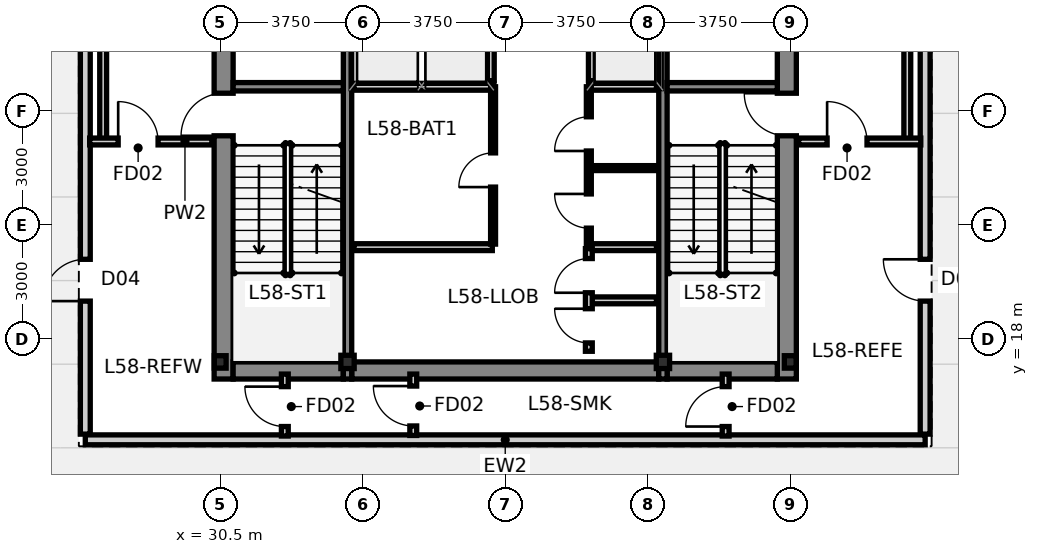
"""IFC4 building model, lengths in metres.
Left out: names, types, materials, properties, quantities, classifications, styles, units other than length and angle.
Written with IfcOpenShell. Run it as: python <this file> out.ifc"""

import sys

from ifc_helpers import new_model, si_unit, direction, frame, frame_2d, origin, origin_2d, place, context, subcontext, project, spatial, rectangle, hollow_rectangle, i_section, extrude, source, transform, mapped, element, fill, save


model = new_model("IFC4")
c1 = context("Model", 3, precision=1e-05, world=origin(), true_north=direction((0.0, 1.0)))
c2 = subcontext(c1, "Body", "Model", "MODEL_VIEW")
j1 = project(units=[si_unit("LENGTHUNIT", "METRE"), si_unit("PLANEANGLEUNIT", "RADIAN")], contexts=[c1])
p1 = place(None, origin())
s1 = spatial("IfcSite", under=j1, at=p1, CompositionType="ELEMENT")
p2 = place(p1, origin())
s2 = spatial("IfcBuilding", under=s1, at=p2, CompositionType="ELEMENT")
p3 = place(p2, frame((0.0, 0.0, 220.55)))
s3 = spatial("IfcBuildingStorey", under=s2, at=p3, CompositionType="ELEMENT", Elevation=220.55)
m1 = source(origin(), c2, "Body", "SweptSolid", [
    extrude(i_section(OverallWidth=0.311, OverallDepth=0.327, WebThickness=0.016, FlangeThickness=0.025, at=origin_2d()), origin(), (0.0, 0.0, 1.0), 4.8),
])
for number, where, z_axis, x_axis in (
    (1, (30.5, 17.4, 0.0), (0.0, 0.0, 1.0), (1.0, 0.0, 0.0)),
    (2, (45.5, 17.4, 0.0), (0.0, 0.0, 1.0), (1.0, 0.0, 0.0)),
):
    element("IfcColumn", number, at=place(p3, frame(where, z_axis=z_axis, x_axis=x_axis)), inside=s3, PredefinedType="COLUMN", context=c2, shape_type="MappedRepresentation", body=[
        mapped(m1, transform((0.0, 0.0, 0.0), scale=1.0)),
    ])
m2 = source(origin(), c2, "Body", "SweptSolid", [
    extrude(hollow_rectangle(XDim=0.35, YDim=0.35, WallThickness=0.016, at=origin_2d()), origin(), (0.0, 0.0, 1.0), 4.8),
])
for number, where, z_axis, x_axis in (
    (3, (33.85, 17.4, 0.0), (0.0, 0.0, 1.0), (1.0, 0.0, 0.0)),
    (4, (42.15, 17.4, 0.0), (0.0, 0.0, 1.0), (1.0, 0.0, 0.0)),
):
    element("IfcColumn", number, at=place(p3, frame(where, z_axis=z_axis, x_axis=x_axis)), inside=s3, PredefinedType="COLUMN", context=c2, shape_type="MappedRepresentation", body=[
        mapped(m2, transform((0.0, 0.0, 0.0), scale=1.0)),
    ])
p4 = place(p3, frame((30.59, 16.95, 0.0), z_axis=(0.0, 0.0, 1.0), x_axis=(0.0, 1.0, 0.0)))
e5 = element("IfcWall", 5, at=p4, inside=s3, PredefinedType="SHEAR", context=c2, shape_type="SweptSolid", body=[
    extrude(rectangle(XDim=13.275, YDim=0.5, at=frame_2d((6.638, 0.0))), origin(), (0.0, 0.0, 1.0), 4.8),
])
p5 = place(p4, frame((6.4, 0.0, 0.0)))
e6 = element("IfcOpeningElement", 6, at=p5, cuts=e5, PredefinedType="OPENING", context=c2, shape_type="SweptSolid", body=[
    extrude(rectangle(XDim=1.12, YDim=2.15, at=frame_2d((0.56, 1.075))), frame((0.0, 0.262, 0.0), z_axis=(0.0, -1.0, 0.0), x_axis=(1.0, 0.0, 0.0)), (0.0, 0.0, 1.0), 0.524),
])
p6 = place(p4, frame((10.85, 0.0, 0.0)))
e7 = element("IfcOpeningElement", 7, at=p6, cuts=e5, PredefinedType="OPENING", context=c2, shape_type="SweptSolid", body=[
    extrude(rectangle(XDim=1.2, YDim=2.2, at=frame_2d((0.6, 1.1))), frame((0.0, 0.262, 0.0), z_axis=(0.0, -1.0, 0.0), x_axis=(1.0, 0.0, 0.0)), (0.0, 0.0, 1.0), 0.524),
])
p7 = place(p3, frame((45.41, 16.95, 0.0), z_axis=(0.0, 0.0, 1.0), x_axis=(0.0, 1.0, 0.0)))
e8 = element("IfcWall", 8, at=p7, inside=s3, PredefinedType="SHEAR", context=c2, shape_type="SweptSolid", body=[
    extrude(rectangle(XDim=13.275, YDim=0.5, at=frame_2d((6.638, 0.0))), origin(), (0.0, 0.0, 1.0), 4.8),
])
p8 = place(p7, frame((6.4, 0.0, 0.0)))
e9 = element("IfcOpeningElement", 9, at=p8, cuts=e8, PredefinedType="OPENING", context=c2, shape_type="SweptSolid", body=[
    extrude(rectangle(XDim=1.12, YDim=2.15, at=frame_2d((0.56, 1.075))), frame((0.0, 0.262, 0.0), z_axis=(0.0, -1.0, 0.0), x_axis=(1.0, 0.0, 0.0)), (0.0, 0.0, 1.0), 0.524),
])
p9 = place(p7, frame((10.85, 0.0, 0.0)))
e10 = element("IfcOpeningElement", 10, at=p9, cuts=e8, PredefinedType="OPENING", context=c2, shape_type="SweptSolid", body=[
    extrude(rectangle(XDim=1.2, YDim=2.2, at=frame_2d((0.6, 1.1))), frame((0.0, 0.262, 0.0), z_axis=(0.0, -1.0, 0.0), x_axis=(1.0, 0.0, 0.0)), (0.0, 0.0, 1.0), 0.524),
])
p10 = place(p3, frame((30.84, 17.175, 0.0), z_axis=(0.0, 0.0, 1.0), x_axis=(1.0, 0.0, 0.0)))
e11 = element("IfcWall", 11, at=p10, inside=s3, PredefinedType="SHEAR", context=c2, shape_type="SweptSolid", body=[
    extrude(rectangle(XDim=2.9, YDim=0.45, at=frame_2d((1.45, 0.0))), origin(), (0.0, 0.0, 1.0), 4.8),
])
p11 = place(p3, frame((33.96, 17.175, 0.0), z_axis=(0.0, 0.0, 1.0), x_axis=(1.0, 0.0, 0.0)))
e12 = element("IfcWall", 12, at=p11, inside=s3, PredefinedType="SHEAR", context=c2, shape_type="SweptSolid", body=[
    extrude(rectangle(XDim=8.08, YDim=0.45, at=frame_2d((4.04, 0.0))), origin(), (0.0, 0.0, 1.0), 4.8),
])
p12 = place(p3, frame((42.26, 17.175, 0.0), z_axis=(0.0, 0.0, 1.0), x_axis=(1.0, 0.0, 0.0)))
e13 = element("IfcWall", 13, at=p12, inside=s3, PredefinedType="SHEAR", context=c2, shape_type="SweptSolid", body=[
    extrude(rectangle(XDim=2.9, YDim=0.45, at=frame_2d((1.45, 0.0))), origin(), (0.0, 0.0, 1.0), 4.8),
])
for number, where, z_axis, x_axis in (
    (14, (33.85, 16.95, 0.0), (0.0, 0.0, 1.0), (0.0, 1.0, 0.0)),
    (15, (42.15, 16.95, 0.0), (0.0, 0.0, 1.0), (0.0, 1.0, 0.0)),
):
    element("IfcWall", number, at=place(p3, frame(where, z_axis=z_axis, x_axis=x_axis)), inside=s3, PredefinedType="SHEAR", context=c2, shape_type="SweptSolid", body=[
        extrude(rectangle(XDim=13.275, YDim=0.22, at=frame_2d((6.638, 0.0))), origin(), (0.0, 0.0, 1.0), 4.8),
    ])
for number, where, z_axis, x_axis in (
    (16, (30.84, 24.64, 0.0), (0.0, 0.0, 1.0), (1.0, 0.0, 0.0)),
    (17, (42.26, 24.64, 0.0), (0.0, 0.0, 1.0), (1.0, 0.0, 0.0)),
):
    element("IfcWall", number, at=place(p3, frame(where, z_axis=z_axis, x_axis=x_axis)), inside=s3, PredefinedType="SHEAR", context=c2, shape_type="SweptSolid", body=[
        extrude(rectangle(XDim=2.9, YDim=0.22, at=frame_2d((1.45, 0.0))), origin(), (0.0, 0.0, 1.0), 4.8),
    ])
p13 = place(p3, frame((26.95, 15.35, 0.0), z_axis=(0.0, 0.0, 1.0), x_axis=(1.0, 0.0, 0.0)))
e18 = element("IfcWall", 18, at=p13, inside=s3, PredefinedType="STANDARD", context=c2, shape_type="SweptSolid", body=[
    extrude(rectangle(XDim=22.1, YDim=0.26, at=frame_2d((11.05, 0.0))), origin(), (0.0, 0.0, 1.0), 4.55),
])
p14 = place(p3, frame((26.95, 15.5, 0.0), z_axis=(0.0, 0.0, 1.0), x_axis=(0.0, 1.0, 0.0)))
e19 = element("IfcWall", 19, at=p14, inside=s3, PredefinedType="STANDARD", context=c2, shape_type="SweptSolid", body=[
    extrude(rectangle(XDim=17.0, YDim=0.26, at=frame_2d((8.5, 0.0))), origin(), (0.0, 0.0, 1.0), 4.228),
])
p15 = place(p14, frame((3.5, 0.0, 0.0)))
e20 = element("IfcOpeningElement", 20, at=p15, cuts=e19, PredefinedType="OPENING", context=c2, shape_type="SweptSolid", body=[
    extrude(rectangle(XDim=1.1, YDim=2.2, at=frame_2d((0.55, 1.1))), frame((0.0, 0.142, 0.0), z_axis=(0.0, -1.0, 0.0), x_axis=(1.0, 0.0, 0.0)), (0.0, 0.0, 1.0), 0.284),
])
p16 = place(p3, frame((49.05, 15.5, 0.0), z_axis=(0.0, 0.0, 1.0), x_axis=(0.0, 1.0, 0.0)))
e21 = element("IfcWall", 21, at=p16, inside=s3, PredefinedType="STANDARD", context=c2, shape_type="SweptSolid", body=[
    extrude(rectangle(XDim=17.0, YDim=0.26, at=frame_2d((8.5, 0.0))), origin(), (0.0, 0.0, 1.0), 4.228),
])
p17 = place(p16, frame((3.5, 0.0, 0.0)))
e22 = element("IfcOpeningElement", 22, at=p17, cuts=e21, PredefinedType="OPENING", context=c2, shape_type="SweptSolid", body=[
    extrude(rectangle(XDim=1.1, YDim=2.2, at=frame_2d((0.55, 1.1))), frame((0.0, 0.142, 0.0), z_axis=(0.0, -1.0, 0.0), x_axis=(1.0, 0.0, 0.0)), (0.0, 0.0, 1.0), 0.284),
])
for number, where, z_axis, x_axis in (
    (23, (37.62, 24.8, 0.0), (0.0, 0.0, 1.0), (0.0, 1.0, 0.0)),
    (24, (40.28, 24.8, 0.0), (0.0, 0.0, 1.0), (0.0, 1.0, 0.0)),
):
    element("IfcWall", number, at=place(p3, frame(where, z_axis=z_axis, x_axis=x_axis)), inside=s3, PredefinedType="PARTITIONING", context=c2, shape_type="SweptSolid", body=[
        extrude(rectangle(XDim=2.0, YDim=0.18, at=frame_2d((1.0, 0.0))), origin(), (0.0, 0.0, 1.0), 4.55),
    ])
p18 = place(p3, frame((34.02, 24.64, 0.0), z_axis=(0.0, 0.0, 1.0), x_axis=(1.0, 0.0, 0.0)))
e25 = element("IfcWall", 25, at=p18, inside=s3, PredefinedType="PARTITIONING", context=c2, shape_type="SweptSolid", body=[
    extrude(rectangle(XDim=3.68, YDim=0.18, at=frame_2d((1.84, 0.0))), origin(), (0.0, 0.0, 1.0), 4.55),
])
p19 = place(p3, frame((40.2, 24.64, 0.0), z_axis=(0.0, 0.0, 1.0), x_axis=(1.0, 0.0, 0.0)))
e26 = element("IfcWall", 26, at=p19, inside=s3, PredefinedType="PARTITIONING", context=c2, shape_type="SweptSolid", body=[
    extrude(rectangle(XDim=1.78, YDim=0.18, at=frame_2d((0.89, 0.0))), origin(), (0.0, 0.0, 1.0), 4.55),
])
p20 = place(p3, frame((27.42, 23.2, 0.0), z_axis=(0.0, 0.0, 1.0), x_axis=(0.0, 1.0, 0.0)))
e27 = element("IfcWall", 27, at=p20, inside=s3, PredefinedType="PARTITIONING", context=c2, shape_type="SweptSolid", body=[
    extrude(rectangle(XDim=6.4, YDim=0.18, at=frame_2d((3.2, 0.0))), origin(), (0.0, 0.0, 1.0), 4.228),
])
p21 = place(p3, frame((27.065, 23.2, 0.0), z_axis=(0.0, 0.0, 1.0), x_axis=(1.0, 0.0, 0.0)))
e28 = element("IfcWall", 28, at=p21, inside=s3, PredefinedType="PARTITIONING", context=c2, shape_type="SweptSolid", body=[
    extrude(rectangle(XDim=3.215, YDim=0.18, at=frame_2d((1.607, 0.0))), origin(), (0.0, 0.0, 1.0), 4.55),
])
p22 = place(p21, frame((0.75, 0.0, 0.0)))
e29 = element("IfcOpeningElement", 29, at=p22, cuts=e28, PredefinedType="OPENING", context=c2, shape_type="SweptSolid", body=[
    extrude(rectangle(XDim=1.05, YDim=2.15, at=frame_2d((0.525, 1.075))), frame((0.0, 0.102, 0.0), z_axis=(0.0, -1.0, 0.0), x_axis=(1.0, 0.0, 0.0)), (0.0, 0.0, 1.0), 0.204),
])
p23 = place(p3, frame((48.58, 23.2, 0.0), z_axis=(0.0, 0.0, 1.0), x_axis=(0.0, 1.0, 0.0)))
e30 = element("IfcWall", 30, at=p23, inside=s3, PredefinedType="PARTITIONING", context=c2, shape_type="SweptSolid", body=[
    extrude(rectangle(XDim=6.4, YDim=0.18, at=frame_2d((3.2, 0.0))), origin(), (0.0, 0.0, 1.0), 4.228),
])
p24 = place(p3, frame((45.72, 23.2, 0.0), z_axis=(0.0, 0.0, 1.0), x_axis=(1.0, 0.0, 0.0)))
e31 = element("IfcWall", 31, at=p24, inside=s3, PredefinedType="PARTITIONING", context=c2, shape_type="SweptSolid", body=[
    extrude(rectangle(XDim=3.215, YDim=0.18, at=frame_2d((1.607, 0.0))), origin(), (0.0, 0.0, 1.0), 4.55),
])
p25 = place(p24, frame((0.75, 0.0, 0.0)))
e32 = element("IfcOpeningElement", 32, at=p25, cuts=e31, PredefinedType="OPENING", context=c2, shape_type="SweptSolid", body=[
    extrude(rectangle(XDim=1.05, YDim=2.15, at=frame_2d((0.525, 1.075))), frame((0.0, 0.102, 0.0), z_axis=(0.0, -1.0, 0.0), x_axis=(1.0, 0.0, 0.0)), (0.0, 0.0, 1.0), 0.204),
])
p26 = place(p3, frame((34.02, 20.42, 0.0), z_axis=(0.0, 0.0, 1.0), x_axis=(1.0, 0.0, 0.0)))
e33 = element("IfcWall", 33, at=p26, inside=s3, PredefinedType="PARTITIONING", context=c2, shape_type="SweptSolid", body=[
    extrude(rectangle(XDim=3.64, YDim=0.18, at=frame_2d((1.82, 0.0))), origin(), (0.0, 0.0, 1.0), 4.55),
])
p27 = place(p3, frame((40.22, 20.42, 0.0), z_axis=(0.0, 0.0, 1.0), x_axis=(1.0, 0.0, 0.0)))
e34 = element("IfcWall", 34, at=p27, inside=s3, PredefinedType="PARTITIONING", context=c2, shape_type="SweptSolid", body=[
    extrude(rectangle(XDim=1.76, YDim=0.18, at=frame_2d((0.88, 0.0))), origin(), (0.0, 0.0, 1.0), 4.55),
])
p28 = place(p3, frame((40.28, 22.5, 0.0), z_axis=(0.0, 0.0, 1.0), x_axis=(1.0, 0.0, 0.0)))
e35 = element("IfcWall", 35, at=p28, inside=s3, PredefinedType="PARTITIONING", context=c2, shape_type="SweptSolid", body=[
    extrude(rectangle(XDim=1.7, YDim=0.13, at=frame_2d((0.85, 0.0))), origin(), (0.0, 0.0, 1.0), 4.55),
])
p29 = place(p3, frame((37.68, 20.5, 0.0), z_axis=(0.0, 0.0, 1.0), x_axis=(0.0, 1.0, 0.0)))
e36 = element("IfcWall", 36, at=p29, inside=s3, PredefinedType="PARTITIONING", context=c2, shape_type="SweptSolid", body=[
    extrude(rectangle(XDim=4.14, YDim=0.13, at=frame_2d((2.07, 0.0))), origin(), (0.0, 0.0, 1.0), 4.55),
])
p30 = place(p29, frame((1.5, 0.0, 0.0)))
e37 = element("IfcOpeningElement", 37, at=p30, cuts=e36, PredefinedType="OPENING", context=c2, shape_type="SweptSolid", body=[
    extrude(rectangle(XDim=0.9, YDim=2.1, at=frame_2d((0.45, 1.05))), frame((0.0, 0.077, 0.0), z_axis=(0.0, -1.0, 0.0), x_axis=(1.0, 0.0, 0.0)), (0.0, 0.0, 1.0), 0.154),
])
p31 = place(p3, frame((40.2, 20.5, 0.0), z_axis=(0.0, 0.0, 1.0), x_axis=(0.0, 1.0, 0.0)))
e38 = element("IfcWall", 38, at=p31, inside=s3, PredefinedType="PARTITIONING", context=c2, shape_type="SweptSolid", body=[
    extrude(rectangle(XDim=4.14, YDim=0.13, at=frame_2d((2.07, 0.0))), origin(), (0.0, 0.0, 1.0), 4.55),
])
p32 = place(p31, frame((0.42, 0.0, 0.0)))
e39 = element("IfcOpeningElement", 39, at=p32, cuts=e38, PredefinedType="OPENING", context=c2, shape_type="SweptSolid", body=[
    extrude(rectangle(XDim=0.9, YDim=2.1, at=frame_2d((0.45, 1.05))), frame((0.0, 0.077, 0.0), z_axis=(0.0, -1.0, 0.0), x_axis=(1.0, 0.0, 0.0)), (0.0, 0.0, 1.0), 0.154),
])
p33 = place(p31, frame((2.45, 0.0, 0.0)))
e40 = element("IfcOpeningElement", 40, at=p33, cuts=e38, PredefinedType="OPENING", context=c2, shape_type="SweptSolid", body=[
    extrude(rectangle(XDim=0.9, YDim=2.1, at=frame_2d((0.45, 1.05))), frame((0.0, 0.077, 0.0), z_axis=(0.0, -1.0, 0.0), x_axis=(1.0, 0.0, 0.0)), (0.0, 0.0, 1.0), 0.154),
])
p34 = place(p3, frame((40.28, 19.02, 0.0), z_axis=(0.0, 0.0, 1.0), x_axis=(1.0, 0.0, 0.0)))
e41 = element("IfcWall", 41, at=p34, inside=s3, PredefinedType="PARTITIONING", context=c2, shape_type="SweptSolid", body=[
    extrude(rectangle(XDim=1.7, YDim=0.18, at=frame_2d((0.85, 0.0))), origin(), (0.0, 0.0, 1.0), 4.55),
])
p35 = place(p3, frame((40.2, 17.68, 0.0), z_axis=(0.0, 0.0, 1.0), x_axis=(0.0, 1.0, 0.0)))
e42 = element("IfcWall", 42, at=p35, inside=s3, PredefinedType="PARTITIONING", context=c2, shape_type="SweptSolid", body=[
    extrude(rectangle(XDim=2.7, YDim=0.18, at=frame_2d((1.35, 0.0))), origin(), (0.0, 0.0, 1.0), 4.55),
])
p36 = place(p35, frame((0.22, 0.0, 0.0)))
e43 = element("IfcOpeningElement", 43, at=p36, cuts=e42, PredefinedType="OPENING", context=c2, shape_type="SweptSolid", body=[
    extrude(rectangle(XDim=0.9, YDim=2.1, at=frame_2d((0.45, 1.05))), frame((0.0, 0.102, 0.0), z_axis=(0.0, -1.0, 0.0), x_axis=(1.0, 0.0, 0.0)), (0.0, 0.0, 1.0), 0.204),
])
p37 = place(p35, frame((1.54, 0.0, 0.0)))
e44 = element("IfcOpeningElement", 44, at=p37, cuts=e42, PredefinedType="OPENING", context=c2, shape_type="SweptSolid", body=[
    extrude(rectangle(XDim=0.9, YDim=2.1, at=frame_2d((0.45, 1.05))), frame((0.0, 0.102, 0.0), z_axis=(0.0, -1.0, 0.0), x_axis=(1.0, 0.0, 0.0)), (0.0, 0.0, 1.0), 0.204),
])
p38 = place(p3, frame((32.2, 15.45, 0.0), z_axis=(0.0, 0.0, 1.0), x_axis=(0.0, 1.0, 0.0)))
e45 = element("IfcWall", 45, at=p38, inside=s3, PredefinedType="PARTITIONING", context=c2, shape_type="SweptSolid", body=[
    extrude(rectangle(XDim=1.63, YDim=0.18, at=frame_2d((0.815, 0.0))), origin(), (0.0, 0.0, 1.0), 4.55),
])
p39 = place(p38, frame((0.25, 0.0, 0.0)))
e46 = element("IfcOpeningElement", 46, at=p39, cuts=e45, PredefinedType="OPENING", context=c2, shape_type="SweptSolid", body=[
    extrude(rectangle(XDim=1.05, YDim=2.15, at=frame_2d((0.525, 1.075))), frame((0.0, 0.102, 0.0), z_axis=(0.0, -1.0, 0.0), x_axis=(1.0, 0.0, 0.0)), (0.0, 0.0, 1.0), 0.204),
])
p40 = place(p3, frame((43.8, 15.45, 0.0), z_axis=(0.0, 0.0, 1.0), x_axis=(0.0, 1.0, 0.0)))
e47 = element("IfcWall", 47, at=p40, inside=s3, PredefinedType="PARTITIONING", context=c2, shape_type="SweptSolid", body=[
    extrude(rectangle(XDim=1.63, YDim=0.18, at=frame_2d((0.815, 0.0))), origin(), (0.0, 0.0, 1.0), 4.55),
])
p41 = place(p40, frame((0.25, 0.0, 0.0)))
e48 = element("IfcOpeningElement", 48, at=p41, cuts=e47, PredefinedType="OPENING", context=c2, shape_type="SweptSolid", body=[
    extrude(rectangle(XDim=1.05, YDim=2.15, at=frame_2d((0.525, 1.075))), frame((0.0, 0.102, 0.0), z_axis=(0.0, -1.0, 0.0), x_axis=(1.0, 0.0, 0.0)), (0.0, 0.0, 1.0), 0.204),
])
p42 = place(p3, frame((35.58, 15.465, 0.0), z_axis=(0.0, 0.0, 1.0), x_axis=(0.0, 1.0, 0.0)))
e49 = element("IfcWall", 49, at=p42, inside=s3, PredefinedType="PARTITIONING", context=c2, shape_type="SweptSolid", body=[
    extrude(rectangle(XDim=1.615, YDim=0.18, at=frame_2d((0.808, 0.0))), origin(), (0.0, 0.0, 1.0), 4.55),
])
p43 = place(p42, frame((0.25, 0.0, 0.0)))
e50 = element("IfcOpeningElement", 50, at=p43, cuts=e49, PredefinedType="OPENING", context=c2, shape_type="SweptSolid", body=[
    extrude(rectangle(XDim=1.05, YDim=2.15, at=frame_2d((0.525, 1.075))), frame((0.0, 0.102, 0.0), z_axis=(0.0, -1.0, 0.0), x_axis=(1.0, 0.0, 0.0)), (0.0, 0.0, 1.0), 0.204),
])
p44 = place(p15, origin())
e51 = element("IfcDoor", 51, at=p44, inside=s3, OperationType="SINGLE_SWING_LEFT", PredefinedType="DOOR", context=c2, shape_type="SweptSolid", body=[
    extrude(rectangle(XDim=1.1, YDim=2.2, at=frame_2d((0.55, 1.1))), frame((0.0, 0.025, 0.0), z_axis=(0.0, -1.0, 0.0), x_axis=(1.0, 0.0, 0.0)), (0.0, 0.0, 1.0), 0.05),
])
fill(e20, e51)
p45 = place(p17, origin())
e52 = element("IfcDoor", 52, at=p45, inside=s3, OperationType="SINGLE_SWING_RIGHT", PredefinedType="DOOR", context=c2, shape_type="SweptSolid", body=[
    extrude(rectangle(XDim=1.1, YDim=2.2, at=frame_2d((0.55, 1.1))), frame((0.0, 0.025, 0.0), z_axis=(0.0, -1.0, 0.0), x_axis=(1.0, 0.0, 0.0)), (0.0, 0.0, 1.0), 0.05),
])
fill(e22, e52)
p46 = place(p5, origin())
e53 = element("IfcDoor", 53, at=p46, inside=s3, OperationType="SINGLE_SWING_LEFT", PredefinedType="DOOR", context=c2, shape_type="SweptSolid", body=[
    extrude(rectangle(XDim=1.12, YDim=2.15, at=frame_2d((0.56, 1.075))), frame((0.0, 0.025, 0.0), z_axis=(0.0, -1.0, 0.0), x_axis=(1.0, 0.0, 0.0)), (0.0, 0.0, 1.0), 0.05),
])
fill(e6, e53)
p47 = place(p8, origin())
e54 = element("IfcDoor", 54, at=p47, inside=s3, OperationType="SINGLE_SWING_RIGHT", PredefinedType="DOOR", context=c2, shape_type="SweptSolid", body=[
    extrude(rectangle(XDim=1.12, YDim=2.15, at=frame_2d((0.56, 1.075))), frame((0.0, 0.025, 0.0), z_axis=(0.0, -1.0, 0.0), x_axis=(1.0, 0.0, 0.0)), (0.0, 0.0, 1.0), 0.05),
])
fill(e9, e54)
p48 = place(p22, origin())
e55 = element("IfcDoor", 55, at=p48, inside=s3, OperationType="SINGLE_SWING_LEFT", PredefinedType="DOOR", context=c2, shape_type="SweptSolid", body=[
    extrude(rectangle(XDim=1.05, YDim=2.15, at=frame_2d((0.525, 1.075))), frame((0.0, 0.025, 0.0), z_axis=(0.0, -1.0, 0.0), x_axis=(1.0, 0.0, 0.0)), (0.0, 0.0, 1.0), 0.05),
])
fill(e29, e55)
p49 = place(p25, origin())
e56 = element("IfcDoor", 56, at=p49, inside=s3, OperationType="SINGLE_SWING_LEFT", PredefinedType="DOOR", context=c2, shape_type="SweptSolid", body=[
    extrude(rectangle(XDim=1.05, YDim=2.15, at=frame_2d((0.525, 1.075))), frame((0.0, 0.025, 0.0), z_axis=(0.0, -1.0, 0.0), x_axis=(1.0, 0.0, 0.0)), (0.0, 0.0, 1.0), 0.05),
])
fill(e32, e56)
p50 = place(p30, origin())
e57 = element("IfcDoor", 57, at=p50, inside=s3, OperationType="SINGLE_SWING_LEFT", PredefinedType="DOOR", context=c2, shape_type="SweptSolid", body=[
    extrude(rectangle(XDim=0.9, YDim=2.1, at=frame_2d((0.45, 1.05))), frame((0.0, 0.025, 0.0), z_axis=(0.0, -1.0, 0.0), x_axis=(1.0, 0.0, 0.0)), (0.0, 0.0, 1.0), 0.05),
])
fill(e37, e57)
p51 = place(p32, origin())
e58 = element("IfcDoor", 58, at=p51, inside=s3, OperationType="SINGLE_SWING_RIGHT", PredefinedType="DOOR", context=c2, shape_type="SweptSolid", body=[
    extrude(rectangle(XDim=0.9, YDim=2.1, at=frame_2d((0.45, 1.05))), frame((0.0, 0.025, 0.0), z_axis=(0.0, -1.0, 0.0), x_axis=(1.0, 0.0, 0.0)), (0.0, 0.0, 1.0), 0.05),
])
fill(e39, e58)
p52 = place(p33, origin())
e59 = element("IfcDoor", 59, at=p52, inside=s3, OperationType="SINGLE_SWING_LEFT", PredefinedType="DOOR", context=c2, shape_type="SweptSolid", body=[
    extrude(rectangle(XDim=0.9, YDim=2.1, at=frame_2d((0.45, 1.05))), frame((0.0, 0.025, 0.0), z_axis=(0.0, -1.0, 0.0), x_axis=(1.0, 0.0, 0.0)), (0.0, 0.0, 1.0), 0.05),
])
fill(e40, e59)
p53 = place(p36, origin())
e60 = element("IfcDoor", 60, at=p53, inside=s3, OperationType="SINGLE_SWING_RIGHT", PredefinedType="DOOR", context=c2, shape_type="SweptSolid", body=[
    extrude(rectangle(XDim=0.9, YDim=2.1, at=frame_2d((0.45, 1.05))), frame((0.0, 0.025, 0.0), z_axis=(0.0, -1.0, 0.0), x_axis=(1.0, 0.0, 0.0)), (0.0, 0.0, 1.0), 0.05),
])
fill(e43, e60)
p54 = place(p37, origin())
e61 = element("IfcDoor", 61, at=p54, inside=s3, OperationType="SINGLE_SWING_LEFT", PredefinedType="DOOR", context=c2, shape_type="SweptSolid", body=[
    extrude(rectangle(XDim=0.9, YDim=2.1, at=frame_2d((0.45, 1.05))), frame((0.0, 0.025, 0.0), z_axis=(0.0, -1.0, 0.0), x_axis=(1.0, 0.0, 0.0)), (0.0, 0.0, 1.0), 0.05),
])
fill(e44, e61)
p55 = place(p39, origin())
e62 = element("IfcDoor", 62, at=p55, inside=s3, OperationType="SINGLE_SWING_RIGHT", PredefinedType="DOOR", context=c2, shape_type="SweptSolid", body=[
    extrude(rectangle(XDim=1.05, YDim=2.15, at=frame_2d((0.525, 1.075))), frame((0.0, 0.025, 0.0), z_axis=(0.0, -1.0, 0.0), x_axis=(1.0, 0.0, 0.0)), (0.0, 0.0, 1.0), 0.05),
])
fill(e46, e62)
p56 = place(p41, origin())
e63 = element("IfcDoor", 63, at=p56, inside=s3, OperationType="SINGLE_SWING_LEFT", PredefinedType="DOOR", context=c2, shape_type="SweptSolid", body=[
    extrude(rectangle(XDim=1.05, YDim=2.15, at=frame_2d((0.525, 1.075))), frame((0.0, 0.025, 0.0), z_axis=(0.0, -1.0, 0.0), x_axis=(1.0, 0.0, 0.0)), (0.0, 0.0, 1.0), 0.05),
])
fill(e48, e63)
p57 = place(p43, origin())
e64 = element("IfcDoor", 64, at=p57, inside=s3, OperationType="SINGLE_SWING_RIGHT", PredefinedType="DOOR", context=c2, shape_type="SweptSolid", body=[
    extrude(rectangle(XDim=1.05, YDim=2.15, at=frame_2d((0.525, 1.075))), frame((0.0, 0.025, 0.0), z_axis=(0.0, -1.0, 0.0), x_axis=(1.0, 0.0, 0.0)), (0.0, 0.0, 1.0), 0.05),
])
fill(e50, e64)
save(model, sys.argv[1])
